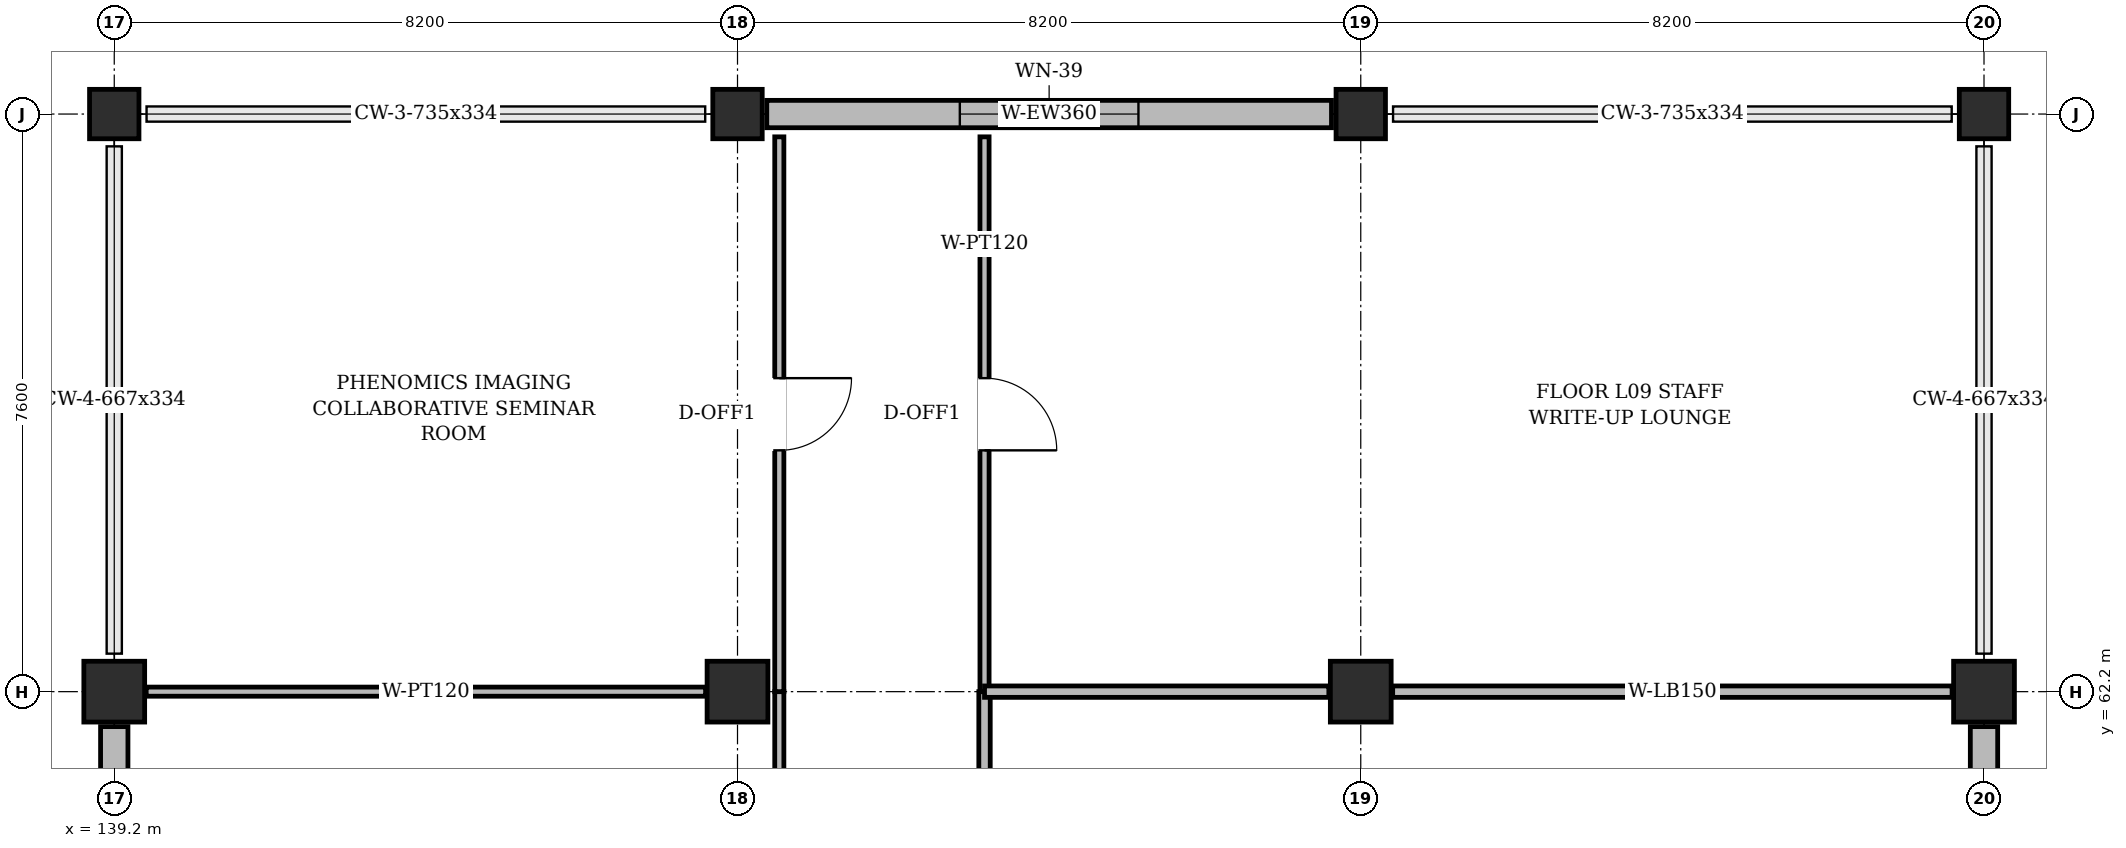
"""IFC4 building model, lengths in metres.
Left out: names, types, materials, properties, quantities, classifications, styles, units other than length and angle.
Written with IfcOpenShell. Run it as: python <this file> out.ifc"""

import sys

from ifc_helpers import new_model, si_unit, direction, frame, frame_2d, origin, origin_2d, place, context, subcontext, project, spatial, rectangle, extrude, element, fill, save


model = new_model("IFC4")
c1 = context("Model", 3, precision=1e-05, world=origin(), true_north=direction((0.0, 1.0)))
c2 = subcontext(c1, "Body", "Model", "MODEL_VIEW")
j1 = project(units=[si_unit("LENGTHUNIT", "METRE"), si_unit("PLANEANGLEUNIT", "RADIAN")], contexts=[c1])
p1 = place(None, origin())
s1 = spatial("IfcSite", under=j1, at=p1, CompositionType="ELEMENT")
p2 = place(p1, origin())
s2 = spatial("IfcBuilding", under=s1, at=p2, CompositionType="ELEMENT")
p3 = place(p2, frame((0.0, 0.0, 40.8)))
s3 = spatial("IfcBuildingStorey", under=s2, at=p3, CompositionType="ELEMENT", Elevation=40.8)
p4 = place(p3, frame((139.2, 62.2, 0.0), z_axis=(0.0, 0.0, 1.0), x_axis=(1.0, 0.0, 0.0)))
e1 = element("IfcColumn", 1, at=p4, inside=s3, PredefinedType="COLUMN", context=c2, shape_type="SweptSolid", body=[
    extrude(rectangle(XDim=0.8, YDim=0.8, at=origin_2d()), origin(), (0.0, 0.0, 1.0), 3.94),
])
p5 = place(p3, frame((139.2, 69.8, 0.0), z_axis=(0.0, 0.0, 1.0), x_axis=(1.0, 0.0, 0.0)))
e2 = element("IfcColumn", 2, at=p5, inside=s3, PredefinedType="COLUMN", context=c2, shape_type="SweptSolid", body=[
    extrude(rectangle(XDim=0.65, YDim=0.65, at=origin_2d()), origin(), (0.0, 0.0, 1.0), 3.94),
])
p6 = place(p3, frame((147.4, 62.2, 0.0), z_axis=(0.0, 0.0, 1.0), x_axis=(1.0, 0.0, 0.0)))
e3 = element("IfcColumn", 3, at=p6, inside=s3, PredefinedType="COLUMN", context=c2, shape_type="SweptSolid", body=[
    extrude(rectangle(XDim=0.8, YDim=0.8, at=origin_2d()), origin(), (0.0, 0.0, 1.0), 3.94),
])
p7 = place(p3, frame((147.4, 69.8, 0.0), z_axis=(0.0, 0.0, 1.0), x_axis=(1.0, 0.0, 0.0)))
e4 = element("IfcColumn", 4, at=p7, inside=s3, PredefinedType="COLUMN", context=c2, shape_type="SweptSolid", body=[
    extrude(rectangle(XDim=0.65, YDim=0.65, at=origin_2d()), origin(), (0.0, 0.0, 1.0), 3.94),
])
p8 = place(p3, frame((155.6, 62.2, 0.0), z_axis=(0.0, 0.0, 1.0), x_axis=(1.0, 0.0, 0.0)))
e5 = element("IfcColumn", 5, at=p8, inside=s3, PredefinedType="COLUMN", context=c2, shape_type="SweptSolid", body=[
    extrude(rectangle(XDim=0.8, YDim=0.8, at=origin_2d()), origin(), (0.0, 0.0, 1.0), 3.94),
])
p9 = place(p3, frame((155.6, 69.8, 0.0), z_axis=(0.0, 0.0, 1.0), x_axis=(1.0, 0.0, 0.0)))
e6 = element("IfcColumn", 6, at=p9, inside=s3, PredefinedType="COLUMN", context=c2, shape_type="SweptSolid", body=[
    extrude(rectangle(XDim=0.65, YDim=0.65, at=origin_2d()), origin(), (0.0, 0.0, 1.0), 3.94),
])
p10 = place(p3, frame((163.8, 62.2, 0.0), z_axis=(0.0, 0.0, 1.0), x_axis=(1.0, 0.0, 0.0)))
e7 = element("IfcColumn", 7, at=p10, inside=s3, PredefinedType="COLUMN", context=c2, shape_type="SweptSolid", body=[
    extrude(rectangle(XDim=0.8, YDim=0.8, at=origin_2d()), origin(), (0.0, 0.0, 1.0), 3.94),
])
p11 = place(p3, frame((163.8, 69.8, 0.0), z_axis=(0.0, 0.0, 1.0), x_axis=(1.0, 0.0, 0.0)))
e8 = element("IfcColumn", 8, at=p11, inside=s3, PredefinedType="COLUMN", context=c2, shape_type="SweptSolid", body=[
    extrude(rectangle(XDim=0.65, YDim=0.65, at=origin_2d()), origin(), (0.0, 0.0, 1.0), 3.94),
])
p12 = place(p3, frame((163.8, 55.06, 0.0), z_axis=(0.0, 0.0, 1.0), x_axis=(0.0, 1.0, 0.0)))
e9 = element("IfcWall", 9, at=p12, inside=s3, PredefinedType="SOLIDWALL", context=c2, shape_type="SweptSolid", body=[
    extrude(rectangle(XDim=6.68, YDim=0.36, at=frame_2d((3.34, 0.0))), origin(), (0.0, 0.0, 1.0), 3.325),
])
p13 = place(p12, frame((2.865, 0.0, 0.95)))
e10 = element("IfcOpeningElement", 10, at=p13, cuts=e9, PredefinedType="OPENING", context=c2, shape_type="SweptSolid", body=[
    extrude(rectangle(XDim=0.95, YDim=1.5, at=frame_2d((0.475, 0.75))), frame((0.0, 0.192, 0.0), z_axis=(0.0, -1.0, 0.0), x_axis=(1.0, 0.0, 0.0)), (0.0, 0.0, 1.0), 0.384),
])
p14 = place(p3, frame((155.215, 69.8, 0.0), z_axis=(0.0, 0.0, 1.0), x_axis=(-1.0, 0.0, 0.0)))
e11 = element("IfcWall", 11, at=p14, inside=s3, PredefinedType="SOLIDWALL", context=c2, shape_type="SweptSolid", body=[
    extrude(rectangle(XDim=7.43, YDim=0.36, at=frame_2d((3.715, 0.0))), origin(), (0.0, 0.0, 1.0), 3.325),
])
p15 = place(p14, frame((2.54, 0.0, 0.95)))
e12 = element("IfcOpeningElement", 12, at=p15, cuts=e11, PredefinedType="OPENING", context=c2, shape_type="SweptSolid", body=[
    extrude(rectangle(XDim=2.35, YDim=1.75, at=frame_2d((1.175, 0.875))), frame((0.0, 0.192, 0.0), z_axis=(0.0, -1.0, 0.0), x_axis=(1.0, 0.0, 0.0)), (0.0, 0.0, 1.0), 0.384),
])
p16 = place(p3, frame((139.2, 61.74, 0.0), z_axis=(0.0, 0.0, 1.0), x_axis=(0.0, -1.0, 0.0)))
e13 = element("IfcWall", 13, at=p16, inside=s3, PredefinedType="SOLIDWALL", context=c2, shape_type="SweptSolid", body=[
    extrude(rectangle(XDim=6.68, YDim=0.36, at=frame_2d((3.34, 0.0))), origin(), (0.0, 0.0, 1.0), 3.325),
])
p17 = place(p16, frame((2.665, 0.0, 0.95)))
e14 = element("IfcOpeningElement", 14, at=p17, cuts=e13, PredefinedType="OPENING", context=c2, shape_type="SweptSolid", body=[
    extrude(rectangle(XDim=1.35, YDim=2.05, at=frame_2d((0.675, 1.025))), frame((0.0, 0.192, 0.0), z_axis=(0.0, -1.0, 0.0), x_axis=(1.0, 0.0, 0.0)), (0.0, 0.0, 1.0), 0.384),
])
p18 = place(p3, frame((150.65, 62.2, 0.0), z_axis=(0.0, 0.0, 1.0), x_axis=(0.0, -1.0, 0.0)))
e15 = element("IfcWall", 15, at=p18, inside=s3, PredefinedType="PARTITIONING", context=c2, shape_type="SweptSolid", body=[
    extrude(rectangle(XDim=25.95, YDim=0.15, at=frame_2d((12.975, 0.0))), origin(), (0.0, 0.0, 1.0), 3.805),
])
p19 = place(p18, frame((12.275, 0.0, 0.0)))
e16 = element("IfcOpeningElement", 16, at=p19, cuts=e15, PredefinedType="OPENING", context=c2, shape_type="SweptSolid", body=[
    extrude(rectangle(XDim=1.4, YDim=2.2, at=frame_2d((0.7, 1.1))), frame((0.0, 0.087, 0.0), z_axis=(0.0, -1.0, 0.0), x_axis=(1.0, 0.0, 0.0)), (0.0, 0.0, 1.0), 0.174),
])
p20 = place(p3, frame((147.95, 46.51, 0.0), z_axis=(0.0, 0.0, 1.0), x_axis=(0.0, 1.0, 0.0)))
e17 = element("IfcWall", 17, at=p20, inside=s3, PredefinedType="PARTITIONING", context=c2, shape_type="SweptSolid", body=[
    extrude(rectangle(XDim=15.69, YDim=0.12, at=frame_2d((7.845, 0.0))), origin(), (0.0, 0.0, 1.0), 3.805),
])
p21 = place(p20, frame((6.443, 0.0, 0.0)))
e18 = element("IfcOpeningElement", 18, at=p21, cuts=e17, PredefinedType="OPENING", context=c2, shape_type="SweptSolid", body=[
    extrude(rectangle(XDim=1.05, YDim=2.2, at=frame_2d((0.525, 1.1))), frame((0.0, 0.072, 0.0), z_axis=(0.0, -1.0, 0.0), x_axis=(1.0, 0.0, 0.0)), (0.0, 0.0, 1.0), 0.144),
])
p22 = place(p3, frame((147.95, 62.2, 0.0), z_axis=(0.0, 0.0, 1.0), x_axis=(0.0, 1.0, 0.0)))
e19 = element("IfcWall", 19, at=p22, inside=s3, PredefinedType="PARTITIONING", context=c2, shape_type="SweptSolid", body=[
    extrude(rectangle(XDim=7.3, YDim=0.12, at=frame_2d((3.65, 0.0))), origin(), (0.0, 0.0, 1.0), 3.805),
])
p23 = place(p22, frame((3.175, 0.0, 0.0)))
e20 = element("IfcOpeningElement", 20, at=p23, cuts=e19, PredefinedType="OPENING", context=c2, shape_type="SweptSolid", body=[
    extrude(rectangle(XDim=0.95, YDim=2.2, at=frame_2d((0.475, 1.1))), frame((0.0, 0.072, 0.0), z_axis=(0.0, -1.0, 0.0), x_axis=(1.0, 0.0, 0.0)), (0.0, 0.0, 1.0), 0.144),
])
p24 = place(p3, frame((150.65, 69.5, 0.0), z_axis=(0.0, 0.0, 1.0), x_axis=(0.0, -1.0, 0.0)))
e21 = element("IfcWall", 21, at=p24, inside=s3, PredefinedType="PARTITIONING", context=c2, shape_type="SweptSolid", body=[
    extrude(rectangle(XDim=7.3, YDim=0.12, at=frame_2d((3.65, 0.0))), origin(), (0.0, 0.0, 1.0), 3.805),
])
p25 = place(p24, frame((3.175, 0.0, 0.0)))
e22 = element("IfcOpeningElement", 22, at=p25, cuts=e21, PredefinedType="OPENING", context=c2, shape_type="SweptSolid", body=[
    extrude(rectangle(XDim=0.95, YDim=2.2, at=frame_2d((0.475, 1.1))), frame((0.0, 0.072, 0.0), z_axis=(0.0, -1.0, 0.0), x_axis=(1.0, 0.0, 0.0)), (0.0, 0.0, 1.0), 0.144),
])
p26 = place(p3, frame((150.65, 62.2, 0.0), z_axis=(0.0, 0.0, 1.0), x_axis=(1.0, 0.0, 0.0)))
e23 = element("IfcWall", 23, at=p26, inside=s3, PredefinedType="PARTITIONING", context=c2, shape_type="SweptSolid", body=[
    extrude(rectangle(XDim=4.53, YDim=0.15, at=frame_2d((2.265, 0.0))), origin(), (0.0, 0.0, 1.0), 3.275),
])
p27 = place(p3, frame((156.02, 62.2, 0.0), z_axis=(0.0, 0.0, 1.0), x_axis=(1.0, 0.0, 0.0)))
e24 = element("IfcWall", 24, at=p27, inside=s3, PredefinedType="PARTITIONING", context=c2, shape_type="SweptSolid", body=[
    extrude(rectangle(XDim=7.36, YDim=0.15, at=frame_2d((3.68, 0.0))), origin(), (0.0, 0.0, 1.0), 3.275),
])
p28 = place(p3, frame((139.62, 62.2, 0.0), z_axis=(0.0, 0.0, 1.0), x_axis=(1.0, 0.0, 0.0)))
e25 = element("IfcWall", 25, at=p28, inside=s3, PredefinedType="PARTITIONING", context=c2, shape_type="SweptSolid", body=[
    extrude(rectangle(XDim=7.36, YDim=0.12, at=frame_2d((3.68, 0.0))), origin(), (0.0, 0.0, 1.0), 3.275),
])
p29 = place(p15, origin())
e26 = element("IfcWindow", 26, at=p29, inside=s3, PartitioningType="DOUBLE_PANEL_VERTICAL", PredefinedType="WINDOW", context=c2, shape_type="SweptSolid", body=[
    extrude(rectangle(XDim=2.35, YDim=1.75, at=frame_2d((1.175, 0.875))), frame((0.0, 0.03, 0.0), z_axis=(0.0, -1.0, 0.0), x_axis=(1.0, 0.0, 0.0)), (0.0, 0.0, 1.0), 0.06),
])
fill(e12, e26)
p30 = place(p23, frame((0.95, 0.0, 0.0), z_axis=(0.0, 0.0, 1.0), x_axis=(-1.0, 0.0, 0.0)))
e27 = element("IfcDoor", 27, at=p30, inside=s3, OperationType="SINGLE_SWING_LEFT", PredefinedType="DOOR", context=c2, shape_type="SweptSolid", body=[
    extrude(rectangle(XDim=0.95, YDim=2.2, at=frame_2d((0.475, 1.1))), frame((0.0, 0.025, 0.0), z_axis=(0.0, -1.0, 0.0), x_axis=(1.0, 0.0, 0.0)), (0.0, 0.0, 1.0), 0.05),
])
fill(e20, e27)
p31 = place(p25, origin())
e28 = element("IfcDoor", 28, at=p31, inside=s3, OperationType="SINGLE_SWING_RIGHT", PredefinedType="DOOR", context=c2, shape_type="SweptSolid", body=[
    extrude(rectangle(XDim=0.95, YDim=2.2, at=frame_2d((0.475, 1.1))), frame((0.0, 0.025, 0.0), z_axis=(0.0, -1.0, 0.0), x_axis=(1.0, 0.0, 0.0)), (0.0, 0.0, 1.0), 0.05),
])
fill(e22, e28)
save(model, sys.argv[1])
